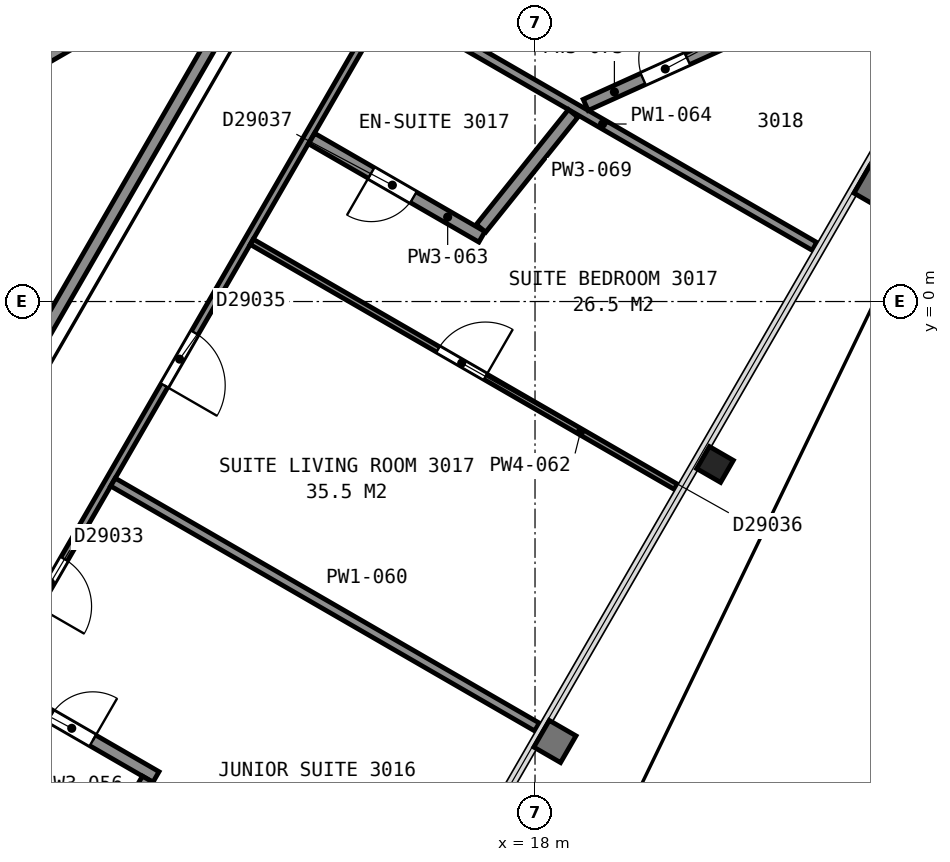
"""IFC4 building model, lengths in metres.
Left out: names, types, materials, properties, quantities, classifications, styles, units other than length and angle.
Written with IfcOpenShell. Run it as: python <this file> out.ifc"""

import sys

from ifc_helpers import new_model, si_unit, direction, frame, frame_2d, origin, origin_2d, place, context, subcontext, project, spatial, rectangle, i_section, extrude, element, fill, save


model = new_model("IFC4")
c1 = context("Model", 3, precision=1e-05, world=origin(), true_north=direction((0.0, 1.0)))
c2 = subcontext(c1, "Body", "Model", "MODEL_VIEW")
j1 = project(units=[si_unit("LENGTHUNIT", "METRE"), si_unit("PLANEANGLEUNIT", "RADIAN")], contexts=[c1])
p1 = place(None, origin())
s1 = spatial("IfcSite", under=j1, at=p1, CompositionType="ELEMENT")
p2 = place(p1, origin())
s2 = spatial("IfcBuilding", under=s1, at=p2, CompositionType="ELEMENT")
p3 = place(p2, frame((0.0, 0.0, 125.2)))
s3 = spatial("IfcBuildingStorey", under=s2, at=p3, CompositionType="ELEMENT", Elevation=125.2)
p4 = place(p3, frame((20.96, -2.68, 0.0), z_axis=(0.0, 0.0, 1.0), x_axis=(-0.5, -0.866025403784, 0.0)))
e1 = element("IfcColumn", 1, at=p4, inside=s3, PredefinedType="COLUMN", context=c2, shape_type="SweptSolid", body=[
    extrude(i_section(OverallWidth=0.419, OverallDepth=0.455, WebThickness=0.042, FlangeThickness=0.068, FilletRadius=0.015, at=origin_2d()), origin(), (0.0, 0.0, 1.0), 3.56),
])
p5 = place(p3, frame((7.678, 2.701, 0.0), z_axis=(0.0, 0.0, 1.0), x_axis=(0.866026010844, 0.49999894854, 0.0)))
e2 = element("IfcWall", 2, at=p5, inside=s3, PredefinedType="PARTITIONING", context=c2, shape_type="SweptSolid", body=[
    extrude(rectangle(XDim=12.0, YDim=0.2, at=frame_2d((6.0, 0.0))), origin(), (0.0, 0.0, 1.0), 3.35),
])
p6 = place(p3, frame((8.492, -3.012, 0.0), z_axis=(0.0, 0.0, 1.0), x_axis=(0.499972957231, 0.866041016371, 0.0)))
e3 = element("IfcWall", 3, at=p6, inside=s3, PredefinedType="PARTITIONING", context=c2, shape_type="SweptSolid", body=[
    extrude(rectangle(XDim=10.349, YDim=0.2, at=frame_2d((5.174, 0.0))), origin(), (0.0, 0.0, 1.0), 3.35),
])
p7 = place(p3, frame((15.684, 5.165, 0.0), z_axis=(0.0, 0.0, 1.0), x_axis=(-0.500027787016, -0.866009360349, 0.0)))
e4 = element("IfcWall", 4, at=p7, inside=s3, PredefinedType="PARTITIONING", context=c2, shape_type="SweptSolid", body=[
    extrude(rectangle(XDim=23.856, YDim=0.125, at=frame_2d((11.928, 0.0))), origin(), (0.0, 0.0, 1.0), 2.613),
])
p8 = place(p7, frame((21.493, 0.0, 0.0)))
e5 = element("IfcOpeningElement", 5, at=p8, cuts=e4, PredefinedType="OPENING", context=c2, shape_type="SweptSolid", body=[
    extrude(rectangle(XDim=1.0, YDim=2.1, at=frame_2d((0.5, 1.05))), frame((0.0, 0.073, 0.0), z_axis=(0.0, -1.0, 0.0), x_axis=(1.0, 0.0, 0.0)), (0.0, 0.0, 1.0), 0.145),
])
p9 = place(p7, frame((10.853, 0.0, 0.0)))
e6 = element("IfcOpeningElement", 6, at=p9, cuts=e4, PredefinedType="OPENING", context=c2, shape_type="SweptSolid", body=[
    extrude(rectangle(XDim=0.9, YDim=2.1, at=frame_2d((0.45, 1.05))), frame((0.0, 0.073, 0.0), z_axis=(0.0, -1.0, 0.0), x_axis=(1.0, 0.0, 0.0)), (0.0, 0.0, 1.0), 0.145),
])
p10 = place(p7, frame((6.558, 0.0, 0.0)))
e7 = element("IfcOpeningElement", 7, at=p10, cuts=e4, PredefinedType="OPENING", context=c2, shape_type="SweptSolid", body=[
    extrude(rectangle(XDim=1.0, YDim=2.1, at=frame_2d((0.5, 1.05))), frame((0.0, 0.073, 0.0), z_axis=(0.0, -1.0, 0.0), x_axis=(1.0, 0.0, 0.0)), (0.0, 0.0, 1.0), 0.145),
])
p11 = place(p3, frame((11.767, -7.819, 0.0), z_axis=(0.0, 0.0, 1.0), x_axis=(-0.866009954834, 0.500026757412, 0.0)))
e8 = element("IfcWall", 8, at=p11, inside=s3, PredefinedType="PARTITIONING", context=c2, shape_type="SweptSolid", body=[
    extrude(rectangle(XDim=3.032, YDim=0.2, at=frame_2d((1.516, 0.0))), origin(), (0.0, 0.0, 1.0), 2.613),
])
p12 = place(p11, frame((1.2, 0.0, 0.0)))
e9 = element("IfcOpeningElement", 9, at=p12, cuts=e8, PredefinedType="OPENING", context=c2, shape_type="SweptSolid", body=[
    extrude(rectangle(XDim=0.8, YDim=2.1, at=frame_2d((0.4, 1.05))), frame((0.0, 0.11, 0.0), z_axis=(0.0, -1.0, 0.0), x_axis=(1.0, 0.0, 0.0)), (0.0, 0.0, 1.0), 0.22),
])
p13 = place(p3, frame((10.52, -9.779, 0.0), z_axis=(0.0, 0.0, 1.0), x_axis=(0.499935013329, 0.866062920605, 0.0)))
e10 = element("IfcWall", 10, at=p13, inside=s3, PredefinedType="PARTITIONING", context=c2, shape_type="SweptSolid", body=[
    extrude(rectangle(XDim=2.22, YDim=0.2, at=frame_2d((1.11, 0.0))), origin(), (0.0, 0.0, 1.0), 2.613),
])
p14 = place(p3, frame((11.059, -2.97, 0.0), z_axis=(0.0, 0.0, 1.0), x_axis=(0.865968957472, -0.500097755139, 0.0)))
e11 = element("IfcWall", 11, at=p14, inside=s3, PredefinedType="PARTITIONING", context=c2, shape_type="SweptSolid", body=[
    extrude(rectangle(XDim=8.052, YDim=0.15, at=frame_2d((4.026, 0.0))), origin(), (0.0, 0.0, 1.0), 2.613),
])
p15 = place(p3, frame((13.341, 0.982, 0.0), z_axis=(0.0, 0.0, 1.0), x_axis=(0.865974505336, -0.500088148337, 0.0)))
e12 = element("IfcWall", 12, at=p15, inside=s3, PredefinedType="PARTITIONING", context=c2, shape_type="SweptSolid", body=[
    extrude(rectangle(XDim=8.052, YDim=0.1, at=frame_2d((4.026, 0.0))), origin(), (0.0, 0.0, 1.0), 2.613),
])
p16 = place(p15, frame((3.538, 0.0, 0.0)))
e13 = element("IfcOpeningElement", 13, at=p16, cuts=e12, PredefinedType="OPENING", context=c2, shape_type="SweptSolid", body=[
    extrude(rectangle(XDim=0.9, YDim=2.1, at=frame_2d((0.45, 1.05))), frame((0.0, 0.06, 0.0), z_axis=(0.0, -1.0, 0.0), x_axis=(1.0, 0.0, 0.0)), (0.0, 0.0, 1.0), 0.12),
])
p17 = place(p3, frame((14.326, 2.68, 0.0), z_axis=(0.0, 0.0, 1.0), x_axis=(0.86609757561, -0.499874973892, 0.0)))
e14 = element("IfcWall", 14, at=p17, inside=s3, PredefinedType="PARTITIONING", context=c2, shape_type="SweptSolid", body=[
    extrude(rectangle(XDim=3.233, YDim=0.2, at=frame_2d((1.617, 0.0))), origin(), (0.0, 0.0, 1.0), 2.613),
])
p18 = place(p17, frame((1.133, 0.0, 0.0)))
e15 = element("IfcOpeningElement", 15, at=p18, cuts=e14, PredefinedType="OPENING", context=c2, shape_type="SweptSolid", body=[
    extrude(rectangle(XDim=0.8, YDim=2.1, at=frame_2d((0.4, 1.05))), frame((0.0, 0.11, 0.0), z_axis=(0.0, -1.0, 0.0), x_axis=(1.0, 0.0, 0.0)), (0.0, 0.0, 1.0), 0.22),
])
p19 = place(p3, frame((15.626, 4.931, 0.0), z_axis=(0.0, 0.0, 1.0), x_axis=(0.866059795523, -0.49994042703, 0.0)))
e16 = element("IfcWall", 16, at=p19, inside=s3, PredefinedType="PARTITIONING", context=c2, shape_type="SweptSolid", body=[
    extrude(rectangle(XDim=8.047, YDim=0.15, at=frame_2d((4.024, 0.0))), origin(), (0.0, 0.0, 1.0), 2.613),
])
p20 = place(p3, frame((17.112, 1.204, 0.0), z_axis=(0.0, 0.0, 1.0), x_axis=(0.625309237246, 0.780377061307, 0.0)))
e17 = element("IfcWall", 17, at=p20, inside=s3, PredefinedType="PARTITIONING", context=c2, shape_type="SweptSolid", body=[
    extrude(rectangle(XDim=2.423, YDim=0.2, at=frame_2d((1.211, 0.0))), origin(), (0.0, 0.0, 1.0), 2.613),
])
p21 = place(p3, frame((18.833, 3.234, 0.0), z_axis=(0.0, 0.0, 1.0), x_axis=(0.911141723421, 0.412093144618, 0.0)))
e18 = element("IfcWall", 18, at=p21, inside=s3, PredefinedType="PARTITIONING", context=c2, shape_type="SweptSolid", body=[
    extrude(rectangle(XDim=2.841, YDim=0.2, at=frame_2d((1.421, 0.0))), origin(), (0.0, 0.0, 1.0), 2.613),
])
p22 = place(p21, frame((1.036, 0.0, 0.0)))
e19 = element("IfcOpeningElement", 19, at=p22, cuts=e18, PredefinedType="OPENING", context=c2, shape_type="SweptSolid", body=[
    extrude(rectangle(XDim=0.8, YDim=2.1, at=frame_2d((0.4, 1.05))), frame((0.0, 0.11, 0.0), z_axis=(0.0, -1.0, 0.0), x_axis=(1.0, 0.0, 0.0)), (0.0, 0.0, 1.0), 0.22),
])
p23 = place(p9, origin())
e20 = element("IfcDoor", 20, at=p23, inside=s3, OperationType="SINGLE_SWING_RIGHT", PredefinedType="DOOR", context=c2, shape_type="SweptSolid", body=[
    extrude(rectangle(XDim=0.9, YDim=2.1, at=frame_2d((0.45, 1.05))), frame((0.0, 0.025, 0.0), z_axis=(0.0, -1.0, 0.0), x_axis=(1.0, 0.0, 0.0)), (0.0, 0.0, 1.0), 0.05),
])
fill(e6, e20)
p24 = place(p10, origin())
e21 = element("IfcDoor", 21, at=p24, inside=s3, OperationType="SINGLE_SWING_RIGHT", PredefinedType="DOOR", context=c2, shape_type="SweptSolid", body=[
    extrude(rectangle(XDim=1.0, YDim=2.1, at=frame_2d((0.5, 1.05))), frame((0.0, 0.025, 0.0), z_axis=(0.0, -1.0, 0.0), x_axis=(1.0, 0.0, 0.0)), (0.0, 0.0, 1.0), 0.05),
])
fill(e7, e21)
p25 = place(p12, origin())
e22 = element("IfcDoor", 22, at=p25, inside=s3, OperationType="SINGLE_SWING_LEFT", PredefinedType="DOOR", context=c2, shape_type="SweptSolid", body=[
    extrude(rectangle(XDim=0.8, YDim=2.1, at=frame_2d((0.4, 1.05))), frame((0.0, 0.025, 0.0), z_axis=(0.0, -1.0, 0.0), x_axis=(1.0, 0.0, 0.0)), (0.0, 0.0, 1.0), 0.05),
])
fill(e9, e22)
p26 = place(p16, origin())
e23 = element("IfcDoor", 23, at=p26, inside=s3, OperationType="SINGLE_SWING_RIGHT", PredefinedType="DOOR", context=c2, shape_type="SweptSolid", body=[
    extrude(rectangle(XDim=0.9, YDim=2.1, at=frame_2d((0.45, 1.05))), frame((0.0, 0.025, 0.0), z_axis=(0.0, -1.0, 0.0), x_axis=(1.0, 0.0, 0.0)), (0.0, 0.0, 1.0), 0.05),
])
fill(e13, e23)
p27 = place(p18, origin())
e24 = element("IfcDoor", 24, at=p27, inside=s3, OperationType="SINGLE_SWING_LEFT", PredefinedType="DOOR", context=c2, shape_type="SweptSolid", body=[
    extrude(rectangle(XDim=0.8, YDim=2.1, at=frame_2d((0.4, 1.05))), frame((0.0, 0.025, 0.0), z_axis=(0.0, -1.0, 0.0), x_axis=(1.0, 0.0, 0.0)), (0.0, 0.0, 1.0), 0.05),
])
fill(e15, e24)
p28 = place(p22, origin())
e25 = element("IfcDoor", 25, at=p28, inside=s3, OperationType="SINGLE_SWING_RIGHT", PredefinedType="DOOR", context=c2, shape_type="SweptSolid", body=[
    extrude(rectangle(XDim=0.8, YDim=2.1, at=frame_2d((0.4, 1.05))), frame((0.0, 0.025, 0.0), z_axis=(0.0, -1.0, 0.0), x_axis=(1.0, 0.0, 0.0)), (0.0, 0.0, 1.0), 0.05),
])
fill(e19, e25)
save(model, sys.argv[1])
